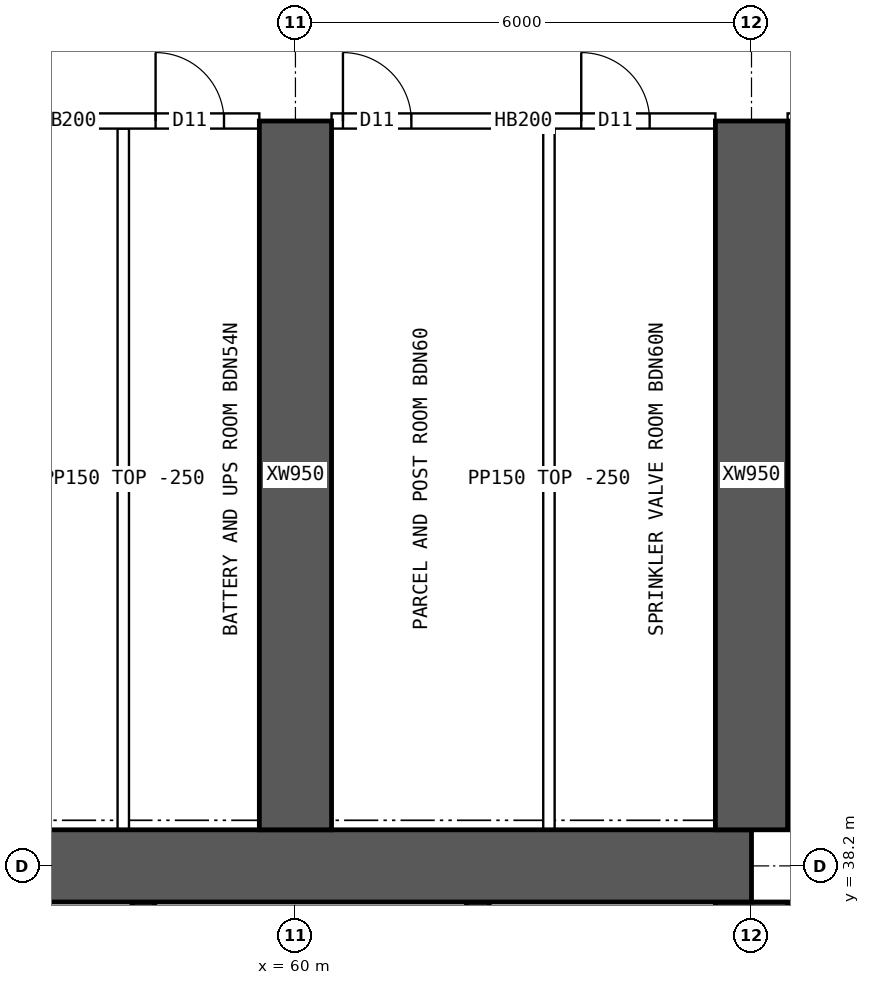
"""IFC4 building model, lengths in metres.
Left out: names, types, materials, properties, quantities, classifications, styles, units other than length and angle.
Written with IfcOpenShell. Run it as: python <this file> out.ifc"""

import sys

from ifc_helpers import new_model, si_unit, direction, frame, frame_2d, origin, place, context, subcontext, project, spatial, rectangle, extrude, element, fill, save


model = new_model("IFC4")
c1 = context("Model", 3, precision=1e-05, world=origin(), true_north=direction((0.0, 1.0)))
c2 = subcontext(c1, "Body", "Model", "MODEL_VIEW")
j1 = project(units=[si_unit("LENGTHUNIT", "METRE"), si_unit("PLANEANGLEUNIT", "RADIAN")], contexts=[c1])
p1 = place(None, origin())
s1 = spatial("IfcSite", under=j1, at=p1, CompositionType="ELEMENT")
p2 = place(p1, origin())
s2 = spatial("IfcBuilding", under=s1, at=p2, CompositionType="ELEMENT")
p3 = place(p2, frame((0.0, 0.0, 118.15)))
s3 = spatial("IfcBuildingStorey", under=s2, at=p3, CompositionType="ELEMENT", Elevation=118.15)
p4 = place(p3, frame((18.0, 38.2, 0.0), z_axis=(0.0, 0.0, 1.0), x_axis=(1.0, 0.0, 0.0)))
e1 = element("IfcWall", 1, at=p4, inside=s3, PredefinedType="SHEAR", context=c2, shape_type="SweptSolid", body=[
    extrude(rectangle(XDim=48.0, YDim=0.95, at=frame_2d((24.0, 0.0))), origin(), (0.0, 0.0, 1.0), 3.75),
])
p5 = place(p3, frame((66.0, 26.275, 0.0), z_axis=(0.0, 0.0, 1.0), x_axis=(0.0, 1.0, 0.0)))
e2 = element("IfcWall", 2, at=p5, inside=s3, PredefinedType="SHEAR", context=c2, shape_type="SweptSolid", body=[
    extrude(rectangle(XDim=11.45, YDim=0.95, at=frame_2d((5.725, 0.0))), origin(), (0.0, 0.0, 1.0), 3.75),
])
p6 = place(p5, frame((5.025, 0.0, 0.0)))
e3 = element("IfcOpeningElement", 3, at=p6, cuts=e2, PredefinedType="OPENING", context=c2, shape_type="SweptSolid", body=[
    extrude(rectangle(XDim=1.2, YDim=2.1, at=frame_2d((0.6, 1.05))), frame((0.0, 0.485, 0.0), z_axis=(0.0, -1.0, 0.0), x_axis=(1.0, 0.0, 0.0)), (0.0, 0.0, 1.0), 0.97),
])
for number, where, z_axis, x_axis in (
    (4, (62.4, 34.75, 0.0), (0.0, 0.0, 1.0), (0.0, 1.0, 0.0)),
    (5, (58.0, 34.75, 0.0), (0.0, 0.0, 1.0), (0.0, 1.0, 0.0)),
):
    element("IfcWall", number, at=place(p3, frame(where, z_axis=z_axis, x_axis=x_axis)), inside=s3, PredefinedType="SHEAR", context=c2, shape_type="SweptSolid", body=[
        extrude(rectangle(XDim=2.975, YDim=0.3, at=frame_2d((1.488, 0.0))), origin(), (0.0, 0.0, 1.0), 3.75),
    ])
for number, where, z_axis, x_axis in (
    (6, (60.0, 38.675, 0.0), (0.0, 0.0, 1.0), (0.0, 1.0, 0.0)),
    (7, (66.0, 38.675, 0.0), (0.0, 0.0, 1.0), (0.0, 1.0, 0.0)),
):
    element("IfcWall", number, at=place(p3, frame(where, z_axis=z_axis, x_axis=x_axis)), inside=s3, PredefinedType="SHEAR", context=c2, shape_type="SweptSolid", body=[
        extrude(rectangle(XDim=9.325, YDim=0.95, at=frame_2d((4.663, 0.0))), origin(), (0.0, 0.0, 1.0), 3.75),
    ])
p7 = place(p3, frame((54.475, 48.0, 0.0), z_axis=(0.0, 0.0, 1.0), x_axis=(1.0, 0.0, 0.0)))
e8 = element("IfcWall", 8, at=p7, inside=s3, PredefinedType="SOLIDWALL", context=c2, shape_type="SweptSolid", body=[
    extrude(rectangle(XDim=5.05, YDim=0.2, at=frame_2d((2.525, 0.0))), origin(), (0.0, 0.0, 1.0), 3.5),
])
p8 = place(p7, frame((0.35, 0.0, 0.0)))
e9 = element("IfcOpeningElement", 9, at=p8, cuts=e8, PredefinedType="OPENING", context=c2, shape_type="SweptSolid", body=[
    extrude(rectangle(XDim=0.9, YDim=2.1, at=frame_2d((0.45, 1.05))), frame((0.0, 0.11, 0.0), z_axis=(0.0, -1.0, 0.0), x_axis=(1.0, 0.0, 0.0)), (0.0, 0.0, 1.0), 0.22),
])
p9 = place(p7, frame((3.685, 0.0, 0.0)))
e10 = element("IfcOpeningElement", 10, at=p9, cuts=e8, PredefinedType="OPENING", context=c2, shape_type="SweptSolid", body=[
    extrude(rectangle(XDim=0.9, YDim=2.1, at=frame_2d((0.45, 1.05))), frame((0.0, 0.11, 0.0), z_axis=(0.0, -1.0, 0.0), x_axis=(1.0, 0.0, 0.0)), (0.0, 0.0, 1.0), 0.22),
])
p10 = place(p3, frame((60.475, 48.0, 0.0), z_axis=(0.0, 0.0, 1.0), x_axis=(1.0, 0.0, 0.0)))
e11 = element("IfcWall", 11, at=p10, inside=s3, PredefinedType="SOLIDWALL", context=c2, shape_type="SweptSolid", body=[
    extrude(rectangle(XDim=5.05, YDim=0.2, at=frame_2d((2.525, 0.0))), origin(), (0.0, 0.0, 1.0), 3.5),
])
p11 = place(p10, frame((0.15, 0.0, 0.0)))
e12 = element("IfcOpeningElement", 12, at=p11, cuts=e11, PredefinedType="OPENING", context=c2, shape_type="SweptSolid", body=[
    extrude(rectangle(XDim=0.9, YDim=2.1, at=frame_2d((0.45, 1.05))), frame((0.0, 0.11, 0.0), z_axis=(0.0, -1.0, 0.0), x_axis=(1.0, 0.0, 0.0)), (0.0, 0.0, 1.0), 0.22),
])
p12 = place(p10, frame((3.285, 0.0, 0.0)))
e13 = element("IfcOpeningElement", 13, at=p12, cuts=e11, PredefinedType="OPENING", context=c2, shape_type="SweptSolid", body=[
    extrude(rectangle(XDim=0.9, YDim=2.1, at=frame_2d((0.45, 1.05))), frame((0.0, 0.11, 0.0), z_axis=(0.0, -1.0, 0.0), x_axis=(1.0, 0.0, 0.0)), (0.0, 0.0, 1.0), 0.22),
])
p13 = place(p3, frame((66.475, 48.0, 0.0), z_axis=(0.0, 0.0, 1.0), x_axis=(1.0, 0.0, 0.0)))
e14 = element("IfcWall", 14, at=p13, inside=s3, PredefinedType="SOLIDWALL", context=c2, shape_type="SweptSolid", body=[
    extrude(rectangle(XDim=1.925, YDim=0.2, at=frame_2d((0.962, 0.0))), origin(), (0.0, 0.0, 1.0), 3.5),
])
p14 = place(p13, frame((0.05, 0.0, 0.0)))
e15 = element("IfcOpeningElement", 15, at=p14, cuts=e14, PredefinedType="OPENING", context=c2, shape_type="SweptSolid", body=[
    extrude(rectangle(XDim=1.2, YDim=2.1, at=frame_2d((0.6, 1.05))), frame((0.0, 0.11, 0.0), z_axis=(0.0, -1.0, 0.0), x_axis=(1.0, 0.0, 0.0)), (0.0, 0.0, 1.0), 0.22),
])
for number, where, z_axis, x_axis in (
    (16, (57.735, 38.675, 0.0), (0.0, 0.0, 1.0), (0.0, 1.0, 0.0)),
    (17, (63.335, 38.675, 0.0), (0.0, 0.0, 1.0), (0.0, 1.0, 0.0)),
):
    element("IfcWall", number, at=place(p3, frame(where, z_axis=z_axis, x_axis=x_axis)), inside=s3, PredefinedType="PARTITIONING", context=c2, shape_type="SweptSolid", body=[
        extrude(rectangle(XDim=9.225, YDim=0.15, at=frame_2d((4.612, 0.0))), origin(), (0.0, 0.0, 1.0), 3.5),
    ])
p15 = place(p9, origin())
e18 = element("IfcDoor", 18, at=p15, inside=s3, OperationType="SINGLE_SWING_LEFT", PredefinedType="DOOR", context=c2, shape_type="SweptSolid", body=[
    extrude(rectangle(XDim=0.9, YDim=2.1, at=frame_2d((0.45, 1.05))), frame((0.0, 0.025, 0.0), z_axis=(0.0, -1.0, 0.0), x_axis=(1.0, 0.0, 0.0)), (0.0, 0.0, 1.0), 0.05),
])
fill(e10, e18)
p16 = place(p11, origin())
e19 = element("IfcDoor", 19, at=p16, inside=s3, OperationType="SINGLE_SWING_LEFT", PredefinedType="DOOR", context=c2, shape_type="SweptSolid", body=[
    extrude(rectangle(XDim=0.9, YDim=2.1, at=frame_2d((0.45, 1.05))), frame((0.0, 0.025, 0.0), z_axis=(0.0, -1.0, 0.0), x_axis=(1.0, 0.0, 0.0)), (0.0, 0.0, 1.0), 0.05),
])
fill(e12, e19)
p17 = place(p12, origin())
e20 = element("IfcDoor", 20, at=p17, inside=s3, OperationType="SINGLE_SWING_LEFT", PredefinedType="DOOR", context=c2, shape_type="SweptSolid", body=[
    extrude(rectangle(XDim=0.9, YDim=2.1, at=frame_2d((0.45, 1.05))), frame((0.0, 0.025, 0.0), z_axis=(0.0, -1.0, 0.0), x_axis=(1.0, 0.0, 0.0)), (0.0, 0.0, 1.0), 0.05),
])
fill(e13, e20)
save(model, sys.argv[1])
